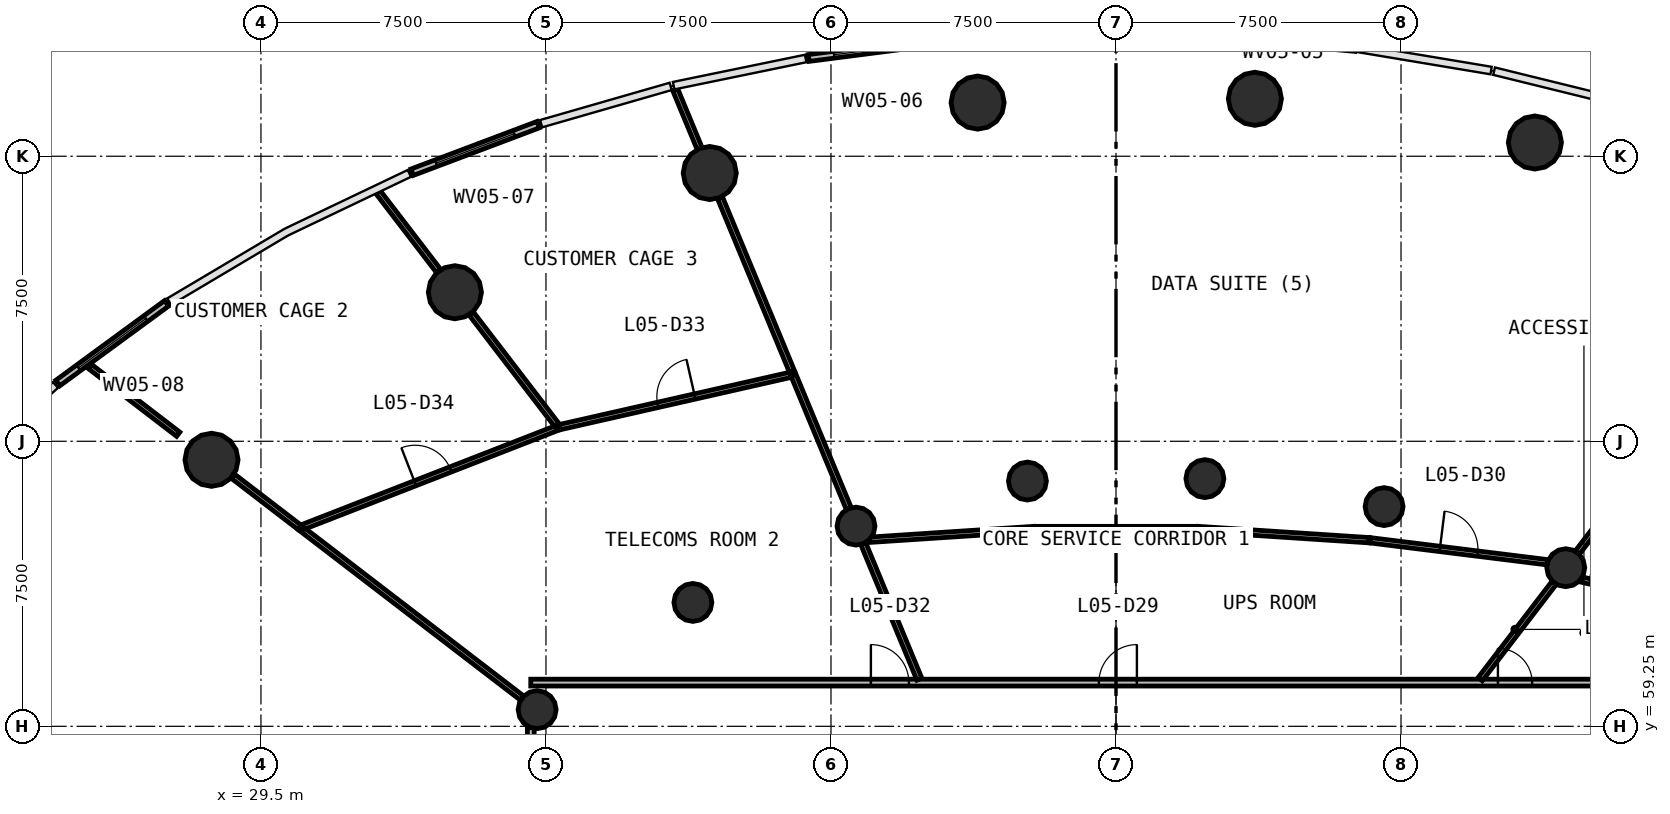
"""IFC4 building model, lengths in metres.
Left out: names, types, materials, properties, quantities, classifications, styles, units other than length and angle.
Written with IfcOpenShell. Run it as: python <this file> out.ifc"""

import sys

from ifc_helpers import new_model, si_unit, direction, frame, frame_2d, origin, origin_2d, place, context, subcontext, project, spatial, rectangle, circle, extrude, source, transform, mapped, element, fill, save


model = new_model("IFC4")
c1 = context("Model", 3, precision=1e-05, world=origin(), true_north=direction((0.0, 1.0)))
c2 = subcontext(c1, "Body", "Model", "MODEL_VIEW")
j1 = project(units=[si_unit("LENGTHUNIT", "METRE"), si_unit("PLANEANGLEUNIT", "RADIAN")], contexts=[c1])
p1 = place(None, origin())
s1 = spatial("IfcSite", under=j1, at=p1, CompositionType="ELEMENT")
p2 = place(p1, origin())
s2 = spatial("IfcBuilding", under=s1, at=p2, CompositionType="ELEMENT")
p3 = place(p2, frame((0.0, 0.0, 22.6)))
s3 = spatial("IfcBuildingStorey", under=s2, at=p3, CompositionType="ELEMENT", Elevation=22.6)
m1 = source(origin(), c2, "Body", "SweptSolid", [
    extrude(circle(Radius=0.7, at=origin_2d()), origin(), (0.0, 0.0, 1.0), 4.4),
])
for number, where, z_axis, x_axis in (
    (1, (63.023, 74.611, 0.0), (0.0, 0.0, 1.0), (1.0, 0.0, 0.0)),
    (2, (55.655, 75.761, 0.0), (0.0, 0.0, 1.0), (1.0, 0.0, 0.0)),
    (3, (48.358, 75.661, 0.0), (0.0, 0.0, 1.0), (1.0, 0.0, 0.0)),
    (4, (41.31, 73.809, 0.0), (0.0, 0.0, 1.0), (1.0, 0.0, 0.0)),
    (5, (34.604, 70.672, 0.0), (0.0, 0.0, 1.0), (1.0, 0.0, 0.0)),
    (6, (28.199, 66.263, 0.0), (0.0, 0.0, 1.0), (1.0, 0.0, 0.0)),
):
    element("IfcColumn", number, at=place(p3, frame(where, z_axis=z_axis, x_axis=x_axis)), inside=s3, PredefinedType="COLUMN", context=c2, shape_type="MappedRepresentation", body=[
        mapped(m1, transform((0.0, 0.0, 0.0), scale=1.0)),
    ])
m2 = source(origin(), c2, "Body", "SweptSolid", [
    extrude(circle(Radius=0.5, at=origin_2d()), origin(), (0.0, 0.0, 1.0), 4.4),
])
for number, where, z_axis, x_axis in (
    (7, (63.835, 63.424, 0.0), (0.0, 0.0, 1.0), (1.0, 0.0, 0.0)),
    (8, (59.055, 65.031, 0.0), (0.0, 0.0, 1.0), (1.0, 0.0, 0.0)),
    (9, (54.339, 65.767, 0.0), (0.0, 0.0, 1.0), (1.0, 0.0, 0.0)),
    (10, (49.669, 65.703, 0.0), (0.0, 0.0, 1.0), (1.0, 0.0, 0.0)),
    (11, (45.158, 64.518, 0.0), (0.0, 0.0, 1.0), (1.0, 0.0, 0.0)),
    (12, (40.866, 62.51, 0.0), (0.0, 0.0, 1.0), (1.0, 0.0, 0.0)),
    (13, (36.768, 59.688, 0.0), (0.0, 0.0, 1.0), (1.0, 0.0, 0.0)),
):
    element("IfcColumn", number, at=place(p3, frame(where, z_axis=z_axis, x_axis=x_axis)), inside=s3, PredefinedType="COLUMN", context=c2, shape_type="MappedRepresentation", body=[
        mapped(m2, transform((0.0, 0.0, 0.0), scale=1.0)),
    ])
p4 = place(p3, frame((47.431, 77.289, 0.0), z_axis=(0.0, 0.0, 1.0), x_axis=(-0.991799548693, -0.127803189364, 0.0)))
e14 = element("IfcWall", 14, at=p4, inside=s3, PredefinedType="STANDARD", context=c2, shape_type="SweptSolid", body=[
    extrude(rectangle(XDim=3.547, YDim=0.18, at=frame_2d((1.774, 0.0))), origin(), (0.0, 0.0, 1.0), 3.95),
])
p5 = place(p4, frame((0.674, 0.0, 0.9)))
e15 = element("IfcOpeningElement", 15, at=p5, cuts=e14, PredefinedType="OPENING", context=c2, shape_type="SweptSolid", body=[
    extrude(rectangle(XDim=2.2, YDim=2.2, at=frame_2d((1.1, 1.1))), frame((0.0, 0.1, 0.0), z_axis=(0.0, -1.0, 0.0), x_axis=(1.0, 0.0, 0.0)), (0.0, 0.0, 1.0), 0.2),
])
p6 = place(p3, frame((36.797, 75.081, 0.0), z_axis=(0.0, 0.0, 1.0), x_axis=(-0.935674191619, -0.352865140157, 0.0)))
e16 = element("IfcWall", 16, at=p6, inside=s3, PredefinedType="STANDARD", context=c2, shape_type="SweptSolid", body=[
    extrude(rectangle(XDim=3.547, YDim=0.18, at=frame_2d((1.774, 0.0))), origin(), (0.0, 0.0, 1.0), 3.95),
])
p7 = place(p6, frame((0.674, 0.0, 0.9)))
e17 = element("IfcOpeningElement", 17, at=p7, cuts=e16, PredefinedType="OPENING", context=c2, shape_type="SweptSolid", body=[
    extrude(rectangle(XDim=2.2, YDim=2.2, at=frame_2d((1.1, 1.1))), frame((0.0, 0.1, 0.0), z_axis=(0.0, -1.0, 0.0), x_axis=(1.0, 0.0, 0.0)), (0.0, 0.0, 1.0), 0.2),
])
p8 = place(p3, frame((27.016, 70.379, 0.0), z_axis=(0.0, 0.0, 1.0), x_axis=(-0.806584417143, -0.591118920373, 0.0)))
e18 = element("IfcWall", 18, at=p8, inside=s3, PredefinedType="STANDARD", context=c2, shape_type="SweptSolid", body=[
    extrude(rectangle(XDim=3.547, YDim=0.18, at=frame_2d((1.773, 0.0))), origin(), (0.0, 0.0, 1.0), 3.95),
])
p9 = place(p8, frame((0.673, 0.0, 0.9)))
e19 = element("IfcOpeningElement", 19, at=p9, cuts=e18, PredefinedType="OPENING", context=c2, shape_type="SweptSolid", body=[
    extrude(rectangle(XDim=2.2, YDim=2.2, at=frame_2d((1.1, 1.1))), frame((0.0, 0.1, 0.0), z_axis=(0.0, -1.0, 0.0), x_axis=(1.0, 0.0, 0.0)), (0.0, 0.0, 1.0), 0.2),
])
p10 = place(p3, frame((36.6, 60.4, 0.0), z_axis=(0.0, 0.0, 1.0), x_axis=(1.0, 0.0, 0.0)))
e20 = element("IfcWall", 20, at=p10, inside=s3, PredefinedType="PARTITIONING", context=c2, shape_type="SweptSolid", body=[
    extrude(rectangle(XDim=30.8, YDim=0.18, at=frame_2d((15.4, 0.0))), origin(), (0.0, 0.0, 1.0), 3.05),
])
p11 = place(p10, frame((25.45, 0.0, 0.0)))
e21 = element("IfcOpeningElement", 21, at=p11, cuts=e20, PredefinedType="OPENING", context=c2, shape_type="SweptSolid", body=[
    extrude(rectangle(XDim=0.9, YDim=2.1, at=frame_2d((0.45, 1.05))), frame((0.0, 0.1, 0.0), z_axis=(0.0, -1.0, 0.0), x_axis=(1.0, 0.0, 0.0)), (0.0, 0.0, 1.0), 0.2),
])
p12 = place(p10, frame((14.95, 0.0, 0.0)))
e22 = element("IfcOpeningElement", 22, at=p12, cuts=e20, PredefinedType="OPENING", context=c2, shape_type="SweptSolid", body=[
    extrude(rectangle(XDim=1.0, YDim=2.1, at=frame_2d((0.5, 1.05))), frame((0.0, 0.1, 0.0), z_axis=(0.0, -1.0, 0.0), x_axis=(1.0, 0.0, 0.0)), (0.0, 0.0, 1.0), 0.2),
])
p13 = place(p10, frame((8.95, 0.0, 0.0)))
e23 = element("IfcOpeningElement", 23, at=p13, cuts=e20, PredefinedType="OPENING", context=c2, shape_type="SweptSolid", body=[
    extrude(rectangle(XDim=1.0, YDim=2.1, at=frame_2d((0.5, 1.05))), frame((0.0, 0.1, 0.0), z_axis=(0.0, -1.0, 0.0), x_axis=(1.0, 0.0, 0.0)), (0.0, 0.0, 1.0), 0.2),
])
p14 = place(p3, frame((36.6, 35.63, 0.0), z_axis=(0.0, 0.0, 1.0), x_axis=(0.0, 1.0, 0.0)))
e24 = element("IfcWall", 24, at=p14, inside=s3, PredefinedType="PARTITIONING", context=c2, shape_type="SweptSolid", body=[
    extrude(rectangle(XDim=23.583, YDim=0.18, at=frame_2d((11.791, 0.0))), origin(), (0.0, 0.0, 1.0), 3.05),
])
p15 = place(p14, frame((14.732, 0.0, 0.0)))
e25 = element("IfcOpeningElement", 25, at=p15, cuts=e24, PredefinedType="OPENING", context=c2, shape_type="SweptSolid", body=[
    extrude(rectangle(XDim=1.0, YDim=2.1, at=frame_2d((0.5, 1.05))), frame((0.0, 0.1, 0.0), z_axis=(0.0, -1.0, 0.0), x_axis=(1.0, 0.0, 0.0)), (0.0, 0.0, 1.0), 0.2),
])
p16 = place(p14, frame((11.333, 0.0, 0.0)))
e26 = element("IfcOpeningElement", 26, at=p16, cuts=e24, PredefinedType="OPENING", context=c2, shape_type="SweptSolid", body=[
    extrude(rectangle(XDim=1.0, YDim=2.1, at=frame_2d((0.5, 1.05))), frame((0.0, 0.1, 0.0), z_axis=(0.0, -1.0, 0.0), x_axis=(1.0, 0.0, 0.0)), (0.0, 0.0, 1.0), 0.2),
])
p17 = place(p3, frame((70.064, 71.541, 0.0), z_axis=(0.0, 0.0, 1.0), x_axis=(-0.608770295053, -0.793346537057, 0.0)))
e27 = element("IfcWall", 27, at=p17, inside=s3, PredefinedType="PARTITIONING", context=c2, shape_type="SweptSolid", body=[
    extrude(rectangle(XDim=9.727, YDim=0.14, at=frame_2d((4.864, 0.0))), origin(), (0.0, 0.0, 1.0), 3.05),
])
p18 = place(p17, frame((4.277, 0.0, 0.0)))
e28 = element("IfcOpeningElement", 28, at=p18, cuts=e27, PredefinedType="OPENING", context=c2, shape_type="SweptSolid", body=[
    extrude(rectangle(XDim=1.0, YDim=2.1, at=frame_2d((0.5, 1.05))), frame((0.0, 0.08, 0.0), z_axis=(0.0, -1.0, 0.0), x_axis=(1.0, 0.0, 0.0)), (0.0, 0.0, 1.0), 0.16),
])
p19 = place(p3, frame((36.367, 59.995, 0.0), z_axis=(0.0, 0.0, 1.0), x_axis=(-0.793358203631, 0.608755090928, 0.0)))
e29 = element("IfcWall", 29, at=p19, inside=s3, PredefinedType="PARTITIONING", context=c2, shape_type="SweptSolid", body=[
    extrude(rectangle(XDim=7.349, YDim=0.14, at=frame_2d((3.675, 0.0))), origin(), (0.0, 0.0, 1.0), 3.05),
])
p20 = place(p3, frame((30.613, 64.499, 0.0), z_axis=(0.0, 0.0, 1.0), x_axis=(0.931844457787, 0.362857970137, 0.0)))
e30 = element("IfcWall", 30, at=p20, inside=s3, PredefinedType="PARTITIONING", context=c2, shape_type="SweptSolid", body=[
    extrude(rectangle(XDim=7.211, YDim=0.14, at=frame_2d((3.605, 0.0))), origin(), (0.0, 0.0, 1.0), 3.05),
])
p21 = place(p20, frame((3.161, 0.0, 0.0)))
e31 = element("IfcOpeningElement", 31, at=p21, cuts=e30, PredefinedType="OPENING", context=c2, shape_type="SweptSolid", body=[
    extrude(rectangle(XDim=1.0, YDim=2.1, at=frame_2d((0.5, 1.05))), frame((0.0, 0.08, 0.0), z_axis=(0.0, -1.0, 0.0), x_axis=(1.0, 0.0, 0.0)), (0.0, 0.0, 1.0), 0.16),
])
p22 = place(p3, frame((37.361, 67.122, 0.0), z_axis=(0.0, 0.0, 1.0), x_axis=(0.975258757594, 0.221066405717, 0.0)))
e32 = element("IfcWall", 32, at=p22, inside=s3, PredefinedType="PARTITIONING", context=c2, shape_type="SweptSolid", body=[
    extrude(rectangle(XDim=6.297, YDim=0.14, at=frame_2d((3.148, 0.0))), origin(), (0.0, 0.0, 1.0), 3.05),
])
p23 = place(p22, frame((2.647, 0.0, 0.0)))
e33 = element("IfcOpeningElement", 33, at=p23, cuts=e32, PredefinedType="OPENING", context=c2, shape_type="SweptSolid", body=[
    extrude(rectangle(XDim=1.0, YDim=2.1, at=frame_2d((0.5, 1.05))), frame((0.0, 0.08, 0.0), z_axis=(0.0, -1.0, 0.0), x_axis=(1.0, 0.0, 0.0)), (0.0, 0.0, 1.0), 0.16),
])
p24 = place(p3, frame((69.936, 61.792, 0.0), z_axis=(0.0, 0.0, 1.0), x_axis=(-0.974090144773, 0.226160097844, 0.0)))
e34 = element("IfcWall", 34, at=p24, inside=s3, PredefinedType="PARTITIONING", context=c2, shape_type="SweptSolid", body=[
    extrude(rectangle(XDim=5.853, YDim=0.14, at=frame_2d((2.927, 0.0))), origin(), (0.0, 0.0, 1.0), 3.05),
])
p25 = place(p3, frame((43.476, 68.58, 0.0), z_axis=(0.0, 0.0, 1.0), x_axis=(-0.382679643563, 0.923881101875, 0.0)))
e35 = element("IfcWall", 35, at=p25, inside=s3, PredefinedType="PARTITIONING", context=c2, shape_type="SweptSolid", body=[
    extrude(rectangle(XDim=4.955, YDim=0.14, at=frame_2d((2.477, 0.0))), origin(), (0.0, 0.0, 1.0), 3.05),
])
p26 = place(p3, frame((58.688, 64.145, 0.0), z_axis=(0.0, 0.0, 1.0), x_axis=(0.992396516621, -0.123081898742, 0.0)))
e36 = element("IfcWall", 36, at=p26, inside=s3, PredefinedType="PARTITIONING", context=c2, shape_type="SweptSolid", body=[
    extrude(rectangle(XDim=4.699, YDim=0.14, at=frame_2d((2.35, 0.0))), origin(), (0.0, 0.0, 1.0), 3.05),
])
p27 = place(p26, frame((1.849, 0.0, 0.0)))
e37 = element("IfcOpeningElement", 37, at=p27, cuts=e36, PredefinedType="OPENING", context=c2, shape_type="SweptSolid", body=[
    extrude(rectangle(XDim=1.0, YDim=2.1, at=frame_2d((0.5, 1.05))), frame((0.0, 0.08, 0.0), z_axis=(0.0, -1.0, 0.0), x_axis=(1.0, 0.0, 0.0)), (0.0, 0.0, 1.0), 0.16),
])
p28 = place(p3, frame((58.658, 64.147, 0.0), z_axis=(0.0, 0.0, 1.0), x_axis=(-0.997859849847, 0.065388990378, 0.0)))
e38 = element("IfcWall", 38, at=p28, inside=s3, PredefinedType="PARTITIONING", context=c2, shape_type="SweptSolid", body=[
    extrude(rectangle(XDim=4.503, YDim=0.14, at=frame_2d((2.251, 0.0))), origin(), (0.0, 0.0, 1.0), 3.05),
])
p29 = place(p3, frame((49.835, 64.441, 0.0), z_axis=(0.0, 0.0, 1.0), x_axis=(-0.997860808016, -0.065374366729, 0.0)))
e39 = element("IfcWall", 39, at=p29, inside=s3, PredefinedType="PARTITIONING", context=c2, shape_type="SweptSolid", body=[
    extrude(rectangle(XDim=4.332, YDim=0.14, at=frame_2d((2.166, 0.0))), origin(), (0.0, 0.0, 1.0), 3.05),
])
p30 = place(p3, frame((54.135, 64.441, 0.0), z_axis=(0.0, 0.0, 1.0), x_axis=(-1.0, 0.0, 0.0)))
e40 = element("IfcWall", 40, at=p30, inside=s3, PredefinedType="PARTITIONING", context=c2, shape_type="SweptSolid", body=[
    extrude(rectangle(XDim=4.269, YDim=0.14, at=frame_2d((2.135, 0.0))), origin(), (0.0, 0.0, 1.0), 3.05),
])
p31 = place(p3, frame((46.826, 60.49, 0.0), z_axis=(0.0, 0.0, 1.0), x_axis=(-0.382644558062, 0.923895633817, 0.0)))
e41 = element("IfcWall", 41, at=p31, inside=s3, PredefinedType="PARTITIONING", context=c2, shape_type="SweptSolid", body=[
    extrude(rectangle(XDim=3.854, YDim=0.14, at=frame_2d((1.927, 0.0))), origin(), (0.0, 0.0, 1.0), 3.05),
])
p32 = place(p3, frame((44.965, 64.984, 0.0), z_axis=(0.0, 0.0, 1.0), x_axis=(-0.382721482583, 0.923863770677, 0.0)))
e42 = element("IfcWall", 42, at=p32, inside=s3, PredefinedType="PARTITIONING", context=c2, shape_type="SweptSolid", body=[
    extrude(rectangle(XDim=3.791, YDim=0.14, at=frame_2d((1.896, 0.0))), origin(), (0.0, 0.0, 1.0), 3.05),
])
p33 = place(p3, frame((37.288, 67.173, 0.0), z_axis=(0.0, 0.0, 1.0), x_axis=(-0.608786962905, 0.79333374679, 0.0)))
e43 = element("IfcWall", 43, at=p33, inside=s3, PredefinedType="PARTITIONING", context=c2, shape_type="SweptSolid", body=[
    extrude(rectangle(XDim=3.706, YDim=0.14, at=frame_2d((1.853, 0.0))), origin(), (0.0, 0.0, 1.0), 3.05),
])
p34 = place(p3, frame((27.323, 66.935, 0.0), z_axis=(0.0, 0.0, 1.0), x_axis=(-0.793378830646, 0.608728207892, 0.0)))
e44 = element("IfcWall", 44, at=p34, inside=s3, PredefinedType="PARTITIONING", context=c2, shape_type="SweptSolid", body=[
    extrude(rectangle(XDim=2.919, YDim=0.14, at=frame_2d((1.46, 0.0))), origin(), (0.0, 0.0, 1.0), 3.05),
])
p35 = place(p3, frame((61.584, 60.49, 0.0), z_axis=(0.0, 0.0, 1.0), x_axis=(0.60874605662, 0.793365135703, 0.0)))
e45 = element("IfcWall", 45, at=p35, inside=s3, PredefinedType="PARTITIONING", context=c2, shape_type="SweptSolid", body=[
    extrude(rectangle(XDim=3.194, YDim=0.14, at=frame_2d((1.597, 0.0))), origin(), (0.0, 0.0, 1.0), 3.05),
])
p36 = place(p3, frame((34.175, 71.23, 0.0), z_axis=(0.0, 0.0, 1.0), x_axis=(-0.608811983243, 0.793314546104, 0.0)))
e46 = element("IfcWall", 46, at=p36, inside=s3, PredefinedType="PARTITIONING", context=c2, shape_type="SweptSolid", body=[
    extrude(rectangle(XDim=2.627, YDim=0.14, at=frame_2d((1.313, 0.0))), origin(), (0.0, 0.0, 1.0), 3.05),
])
p37 = place(p3, frame((30.513, 64.488, 0.0), z_axis=(0.0, 0.0, 1.0), x_axis=(-0.793382466046, 0.608723469706, 0.0)))
e47 = element("IfcWall", 47, at=p37, inside=s3, PredefinedType="PARTITIONING", context=c2, shape_type="SweptSolid", body=[
    extrude(rectangle(XDim=2.212, YDim=0.14, at=frame_2d((1.106, 0.0))), origin(), (0.0, 0.0, 1.0), 3.05),
])
p38 = place(p3, frame((41.04, 74.46, 0.0), z_axis=(0.0, 0.0, 1.0), x_axis=(-0.382571117301, 0.923926046936, 0.0)))
e48 = element("IfcWall", 48, at=p38, inside=s3, PredefinedType="PARTITIONING", context=c2, shape_type="SweptSolid", body=[
    extrude(rectangle(XDim=1.671, YDim=0.14, at=frame_2d((0.836, 0.0))), origin(), (0.0, 0.0, 1.0), 3.05),
])
m3 = source(origin(), c2, "Body", "SweptSolid", [
    extrude(rectangle(XDim=2.2, YDim=2.2, at=frame_2d((1.1, 1.1))), frame((0.0, 0.03, 0.0), z_axis=(0.0, -1.0, 0.0), x_axis=(1.0, 0.0, 0.0)), (0.0, 0.0, 1.0), 0.06),
])
p39 = place(p5, origin())
e49 = element("IfcWindow", 49, at=p39, inside=s3, PartitioningType="SINGLE_PANEL", PredefinedType="WINDOW", context=c2, shape_type="MappedRepresentation", body=[
    mapped(m3, transform((0.0, 0.0, 0.0), scale=1.0)),
])
fill(e15, e49)
p40 = place(p7, origin())
e50 = element("IfcWindow", 50, at=p40, inside=s3, PartitioningType="SINGLE_PANEL", PredefinedType="WINDOW", context=c2, shape_type="MappedRepresentation", body=[
    mapped(m3, transform((0.0, 0.0, 0.0), scale=1.0)),
])
fill(e17, e50)
p41 = place(p9, origin())
e51 = element("IfcWindow", 51, at=p41, inside=s3, PartitioningType="SINGLE_PANEL", PredefinedType="WINDOW", context=c2, shape_type="MappedRepresentation", body=[
    mapped(m3, transform((0.0, 0.0, 0.0), scale=1.0)),
])
fill(e19, e51)
m4 = source(origin(), c2, "Body", "SweptSolid", [
    extrude(rectangle(XDim=0.9, YDim=2.1, at=frame_2d((0.45, 1.05))), frame((0.0, 0.025, 0.0), z_axis=(0.0, -1.0, 0.0), x_axis=(1.0, 0.0, 0.0)), (0.0, 0.0, 1.0), 0.05),
])
p42 = place(p11, origin())
e52 = element("IfcDoor", 52, at=p42, inside=s3, OperationType="SINGLE_SWING_LEFT", PredefinedType="DOOR", context=c2, shape_type="MappedRepresentation", body=[
    mapped(m4, transform((0.0, 0.0, 0.0), scale=1.0)),
])
fill(e21, e52)
m5 = source(origin(), c2, "Body", "SweptSolid", [
    extrude(rectangle(XDim=1.0, YDim=2.1, at=frame_2d((0.5, 1.05))), frame((0.0, 0.025, 0.0), z_axis=(0.0, -1.0, 0.0), x_axis=(1.0, 0.0, 0.0)), (0.0, 0.0, 1.0), 0.05),
])
p43 = place(p12, origin())
e53 = element("IfcDoor", 53, at=p43, inside=s3, OperationType="SINGLE_SWING_RIGHT", PredefinedType="DOOR", context=c2, shape_type="MappedRepresentation", body=[
    mapped(m5, transform((0.0, 0.0, 0.0), scale=1.0)),
])
fill(e22, e53)
p44 = place(p27, origin())
e54 = element("IfcDoor", 54, at=p44, inside=s3, OperationType="SINGLE_SWING_LEFT", PredefinedType="DOOR", context=c2, shape_type="MappedRepresentation", body=[
    mapped(m5, transform((0.0, 0.0, 0.0), scale=1.0)),
])
fill(e37, e54)
p45 = place(p13, origin())
e55 = element("IfcDoor", 55, at=p45, inside=s3, OperationType="SINGLE_SWING_LEFT", PredefinedType="DOOR", context=c2, shape_type="MappedRepresentation", body=[
    mapped(m5, transform((0.0, 0.0, 0.0), scale=1.0)),
])
fill(e23, e55)
p46 = place(p23, origin())
e56 = element("IfcDoor", 56, at=p46, inside=s3, OperationType="SINGLE_SWING_RIGHT", PredefinedType="DOOR", context=c2, shape_type="MappedRepresentation", body=[
    mapped(m5, transform((0.0, 0.0, 0.0), scale=1.0)),
])
fill(e33, e56)
p47 = place(p21, origin())
e57 = element("IfcDoor", 57, at=p47, inside=s3, OperationType="SINGLE_SWING_LEFT", PredefinedType="DOOR", context=c2, shape_type="MappedRepresentation", body=[
    mapped(m5, transform((0.0, 0.0, 0.0), scale=1.0)),
])
fill(e31, e57)
save(model, sys.argv[1])
